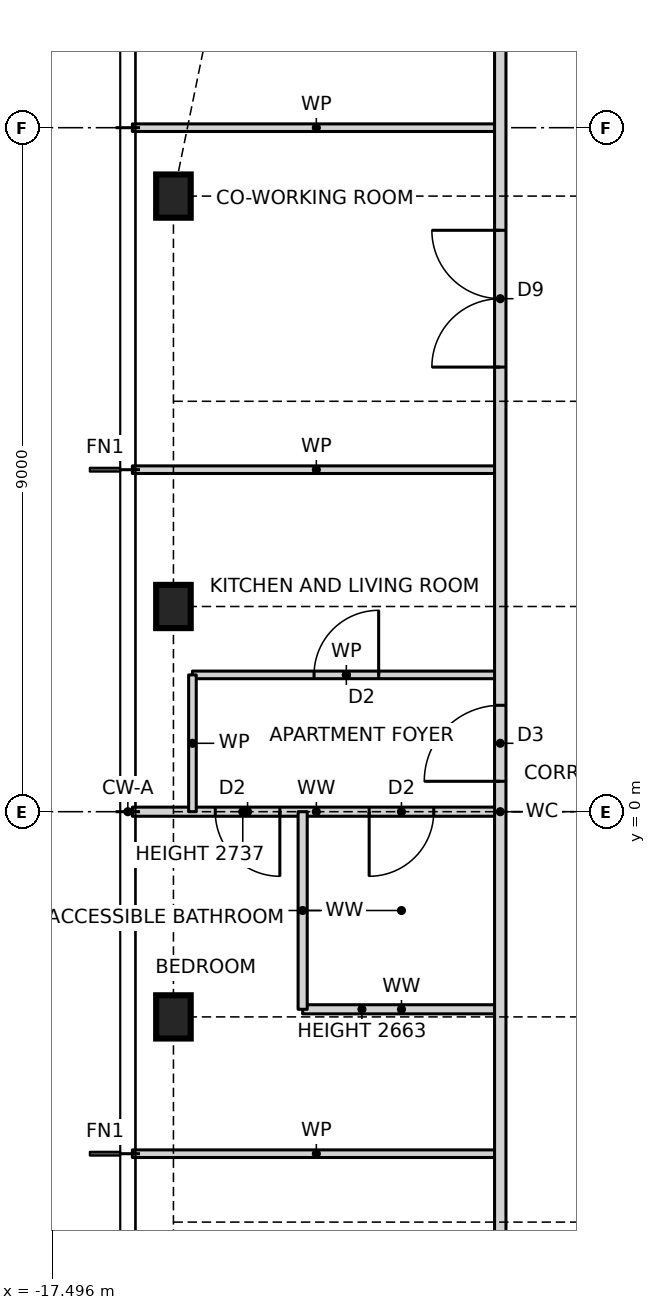
"""IFC4 building model, lengths in metres.
Left out: names, types, materials, properties, quantities, classifications, styles, units other than length and angle.
Written with IfcOpenShell. Run it as: python <this file> out.ifc"""

import sys

from ifc_helpers import new_model, si_unit, direction, frame, frame_2d, origin, origin_2d, place, context, subcontext, project, spatial, rectangle, i_section, extrude, element, fill, save


model = new_model("IFC4")
c1 = context("Model", 3, precision=1e-05, world=origin(), true_north=direction((0.0, 1.0)))
c2 = subcontext(c1, "Body", "Model", "MODEL_VIEW")
j1 = project(units=[si_unit("LENGTHUNIT", "METRE"), si_unit("PLANEANGLEUNIT", "RADIAN")], contexts=[c1])
p1 = place(None, origin())
s1 = spatial("IfcSite", under=j1, at=p1, CompositionType="ELEMENT")
p2 = place(p1, origin())
s2 = spatial("IfcBuilding", under=s1, at=p2, CompositionType="ELEMENT")
p3 = place(p2, frame((0.0, 0.0, 257.0)))
s3 = spatial("IfcBuildingStorey", under=s2, at=p3, CompositionType="ELEMENT", Elevation=257.0)
for number, where, z_axis, x_axis in (
    (1, (-15.9, 8.1, 0.0), (0.0, 0.0, 1.0), (1.0, 0.0, 0.0)),
    (2, (-15.9, 2.7, 0.0), (0.0, 0.0, 1.0), (1.0, 0.0, 0.0)),
    (3, (-15.9, -2.7, 0.0), (0.0, 0.0, 1.0), (1.0, 0.0, 0.0)),
):
    element("IfcColumn", number, at=place(p3, frame(where, z_axis=z_axis, x_axis=x_axis)), inside=s3, PredefinedType="COLUMN", context=c2, shape_type="SweptSolid", body=[
        extrude(i_section(OverallWidth=0.455, OverallDepth=0.569, WebThickness=0.078, FlangeThickness=0.125, at=origin_2d()), origin(), (0.0, 0.0, 1.0), 3.5),
    ])
p4 = place(p3, frame((-16.44, -4.5, 0.0), z_axis=(0.0, 0.0, 1.0), x_axis=(1.0, 0.0, 0.0)))
e4 = element("IfcWall", 4, at=p4, inside=s3, PredefinedType="PARTITIONING", context=c2, shape_type="SweptSolid", body=[
    extrude(rectangle(XDim=4.84, YDim=0.1, at=frame_2d((2.42, 0.0))), origin(), (0.0, 0.0, 1.0), 3.27),
])
p5 = place(p3, frame((-14.2, -2.6, 0.0), z_axis=(0.0, 0.0, 1.0), x_axis=(1.0, 0.0, 0.0)))
e5 = element("IfcWall", 5, at=p5, inside=s3, PredefinedType="PARTITIONING", context=c2, shape_type="SweptSolid", body=[
    extrude(rectangle(XDim=2.6, YDim=0.12, at=frame_2d((1.3, 0.0))), origin(), (0.0, 0.0, 1.0), 2.663),
])
p6 = place(p3, frame((-16.44, 0.0, 0.0), z_axis=(0.0, 0.0, 1.0), x_axis=(1.0, 0.0, 0.0)))
e6 = element("IfcWall", 6, at=p6, inside=s3, PredefinedType="PARTITIONING", context=c2, shape_type="SweptSolid", body=[
    extrude(rectangle(XDim=4.84, YDim=0.12, at=frame_2d((2.42, 0.0))), origin(), (0.0, 0.0, 1.0), 2.737),
])
p7 = place(p6, frame((1.09, 0.0, 0.0)))
e7 = element("IfcOpeningElement", 7, at=p7, cuts=e6, PredefinedType="OPENING", context=c2, shape_type="SweptSolid", body=[
    extrude(rectangle(XDim=0.85, YDim=2.1, at=frame_2d((0.425, 1.05))), frame((0.0, 0.07, 0.0), z_axis=(0.0, -1.0, 0.0), x_axis=(1.0, 0.0, 0.0)), (0.0, 0.0, 1.0), 0.14),
])
p8 = place(p6, frame((3.115, 0.0, 0.0)))
e8 = element("IfcOpeningElement", 8, at=p8, cuts=e6, PredefinedType="OPENING", context=c2, shape_type="SweptSolid", body=[
    extrude(rectangle(XDim=0.85, YDim=2.1, at=frame_2d((0.425, 1.05))), frame((0.0, 0.07, 0.0), z_axis=(0.0, -1.0, 0.0), x_axis=(1.0, 0.0, 0.0)), (0.0, 0.0, 1.0), 0.14),
])
p9 = place(p3, frame((-15.65, 1.8, 0.0), z_axis=(0.0, 0.0, 1.0), x_axis=(1.0, 0.0, 0.0)))
e9 = element("IfcWall", 9, at=p9, inside=s3, PredefinedType="PARTITIONING", context=c2, shape_type="SweptSolid", body=[
    extrude(rectangle(XDim=4.05, YDim=0.1, at=frame_2d((2.025, 0.0))), origin(), (0.0, 0.0, 1.0), 3.27),
])
p10 = place(p9, frame((1.6, 0.0, 0.0)))
e10 = element("IfcOpeningElement", 10, at=p10, cuts=e9, PredefinedType="OPENING", context=c2, shape_type="SweptSolid", body=[
    extrude(rectangle(XDim=0.85, YDim=2.1, at=frame_2d((0.425, 1.05))), frame((0.0, 0.06, 0.0), z_axis=(0.0, -1.0, 0.0), x_axis=(1.0, 0.0, 0.0)), (0.0, 0.0, 1.0), 0.12),
])
for number, where, z_axis, x_axis in (
    (11, (-16.44, 4.5, 0.0), (0.0, 0.0, 1.0), (1.0, 0.0, 0.0)),
    (12, (-16.44, 9.0, 0.0), (0.0, 0.0, 1.0), (1.0, 0.0, 0.0)),
):
    element("IfcWall", number, at=place(p3, frame(where, z_axis=z_axis, x_axis=x_axis)), inside=s3, PredefinedType="PARTITIONING", context=c2, shape_type="SweptSolid", body=[
        extrude(rectangle(XDim=4.84, YDim=0.1, at=frame_2d((2.42, 0.0))), origin(), (0.0, 0.0, 1.0), 3.27),
    ])
p11 = place(p3, frame((-11.6, -11.6, 0.0), z_axis=(0.0, 0.0, 1.0), x_axis=(0.0, 1.0, 0.0)))
e13 = element("IfcWall", 13, at=p11, inside=s3, PredefinedType="PARTITIONING", context=c2, shape_type="SweptSolid", body=[
    extrude(rectangle(XDim=23.2, YDim=0.15, at=frame_2d((11.6, 0.0))), origin(), (0.0, 0.0, 1.0), 3.27),
])
p12 = place(p11, frame((17.45, 0.0, 0.0)))
e14 = element("IfcOpeningElement", 14, at=p12, cuts=e13, PredefinedType="OPENING", context=c2, shape_type="SweptSolid", body=[
    extrude(rectangle(XDim=1.8, YDim=2.1, at=frame_2d((0.9, 1.05))), frame((0.0, 0.085, 0.0), z_axis=(0.0, -1.0, 0.0), x_axis=(1.0, 0.0, 0.0)), (0.0, 0.0, 1.0), 0.17),
])
p13 = place(p11, frame((12.0, 0.0, 0.0)))
e15 = element("IfcOpeningElement", 15, at=p13, cuts=e13, PredefinedType="OPENING", context=c2, shape_type="SweptSolid", body=[
    extrude(rectangle(XDim=1.0, YDim=2.1, at=frame_2d((0.5, 1.05))), frame((0.0, 0.085, 0.0), z_axis=(0.0, -1.0, 0.0), x_axis=(1.0, 0.0, 0.0)), (0.0, 0.0, 1.0), 0.17),
])
p14 = place(p11, frame((2.65, 0.0, 0.0)))
e16 = element("IfcOpeningElement", 16, at=p14, cuts=e13, PredefinedType="OPENING", context=c2, shape_type="SweptSolid", body=[
    extrude(rectangle(XDim=1.8, YDim=2.1, at=frame_2d((0.9, 1.05))), frame((0.0, 0.085, 0.0), z_axis=(0.0, -1.0, 0.0), x_axis=(1.0, 0.0, 0.0)), (0.0, 0.0, 1.0), 0.17),
])
p15 = place(p3, frame((-14.2, -2.6, 0.0), z_axis=(0.0, 0.0, 1.0), x_axis=(0.0, 1.0, 0.0)))
e17 = element("IfcWall", 17, at=p15, inside=s3, PredefinedType="PARTITIONING", context=c2, shape_type="SweptSolid", body=[
    extrude(rectangle(XDim=2.6, YDim=0.12, at=frame_2d((1.3, 0.0))), origin(), (0.0, 0.0, 1.0), 3.27),
])
p16 = place(p3, frame((-15.65, 0.0, 0.0), z_axis=(0.0, 0.0, 1.0), x_axis=(0.0, 1.0, 0.0)))
e18 = element("IfcWall", 18, at=p16, inside=s3, PredefinedType="PARTITIONING", context=c2, shape_type="SweptSolid", body=[
    extrude(rectangle(XDim=1.8, YDim=0.1, at=frame_2d((0.9, 0.0))), origin(), (0.0, 0.0, 1.0), 3.27),
])
p17 = place(p12, origin())
e19 = element("IfcDoor", 19, at=p17, inside=s3, OperationType="DOUBLE_DOOR_SINGLE_SWING", PredefinedType="DOOR", context=c2, shape_type="SweptSolid", body=[
    extrude(rectangle(XDim=1.8, YDim=2.1, at=frame_2d((0.9, 1.05))), frame((0.0, 0.025, 0.0), z_axis=(0.0, -1.0, 0.0), x_axis=(1.0, 0.0, 0.0)), (0.0, 0.0, 1.0), 0.05),
])
fill(e14, e19)
p18 = place(p13, origin())
e20 = element("IfcDoor", 20, at=p18, inside=s3, OperationType="SINGLE_SWING_LEFT", PredefinedType="DOOR", context=c2, shape_type="SweptSolid", body=[
    extrude(rectangle(XDim=1.0, YDim=2.1, at=frame_2d((0.5, 1.05))), frame((0.0, 0.025, 0.0), z_axis=(0.0, -1.0, 0.0), x_axis=(1.0, 0.0, 0.0)), (0.0, 0.0, 1.0), 0.05),
])
fill(e15, e20)
p19 = place(p10, origin())
e21 = element("IfcDoor", 21, at=p19, inside=s3, OperationType="SINGLE_SWING_RIGHT", PredefinedType="DOOR", context=c2, shape_type="SweptSolid", body=[
    extrude(rectangle(XDim=0.85, YDim=2.1, at=frame_2d((0.425, 1.05))), frame((0.0, 0.025, 0.0), z_axis=(0.0, -1.0, 0.0), x_axis=(1.0, 0.0, 0.0)), (0.0, 0.0, 1.0), 0.05),
])
fill(e10, e21)
p20 = place(p7, frame((0.85, 0.0, 0.0), z_axis=(0.0, 0.0, 1.0), x_axis=(-1.0, 0.0, 0.0)))
e22 = element("IfcDoor", 22, at=p20, inside=s3, OperationType="SINGLE_SWING_LEFT", PredefinedType="DOOR", context=c2, shape_type="SweptSolid", body=[
    extrude(rectangle(XDim=0.85, YDim=2.1, at=frame_2d((0.425, 1.05))), frame((0.0, 0.025, 0.0), z_axis=(0.0, -1.0, 0.0), x_axis=(1.0, 0.0, 0.0)), (0.0, 0.0, 1.0), 0.05),
])
fill(e7, e22)
p21 = place(p8, frame((0.85, 0.0, 0.0), z_axis=(0.0, 0.0, 1.0), x_axis=(-1.0, 0.0, 0.0)))
e23 = element("IfcDoor", 23, at=p21, inside=s3, OperationType="SINGLE_SWING_RIGHT", PredefinedType="DOOR", context=c2, shape_type="SweptSolid", body=[
    extrude(rectangle(XDim=0.85, YDim=2.1, at=frame_2d((0.425, 1.05))), frame((0.0, 0.025, 0.0), z_axis=(0.0, -1.0, 0.0), x_axis=(1.0, 0.0, 0.0)), (0.0, 0.0, 1.0), 0.05),
])
fill(e8, e23)
save(model, sys.argv[1])
